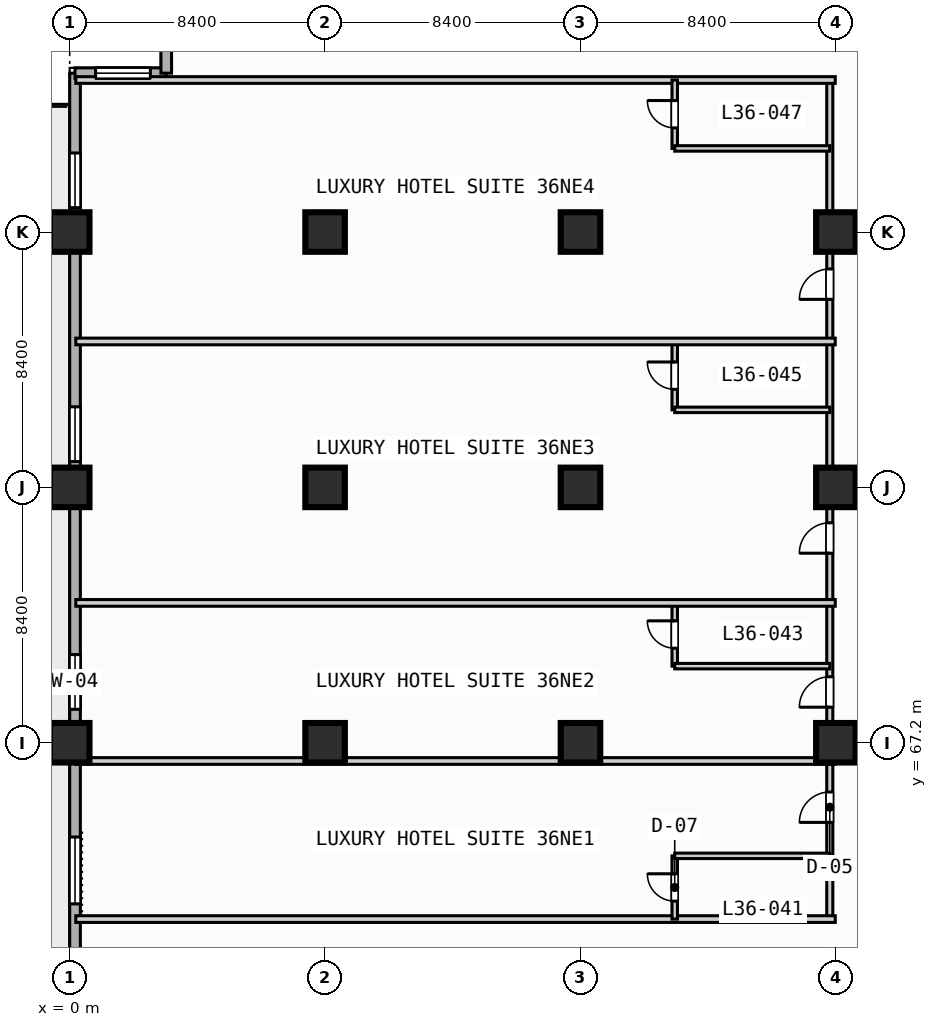
"""IFC4 building model, lengths in metres.
Left out: names, types, materials, properties, quantities, classifications, styles, units other than length and angle.
Written with IfcOpenShell. Run it as: python <this file> out.ifc"""

import sys

from ifc_helpers import new_model, si_unit, direction, frame, frame_2d, origin, origin_2d, place, context, subcontext, project, spatial, rectangle, extrude, element, fill, save


model = new_model("IFC4")
c1 = context("Model", 3, precision=1e-05, world=origin(), true_north=direction((0.0, 1.0)))
c2 = subcontext(c1, "Body", "Model", "MODEL_VIEW")
j1 = project(units=[si_unit("LENGTHUNIT", "METRE"), si_unit("PLANEANGLEUNIT", "RADIAN")], contexts=[c1])
p1 = place(None, origin())
s1 = spatial("IfcSite", under=j1, at=p1, CompositionType="ELEMENT")
p2 = place(p1, origin())
s2 = spatial("IfcBuilding", under=s1, at=p2, CompositionType="ELEMENT")
p3 = place(p2, frame((0.0, 0.0, 149.4)))
s3 = spatial("IfcBuildingStorey", under=s2, at=p3, CompositionType="ELEMENT", Elevation=149.4)
for number, where, z_axis, x_axis in (
    (1, (0.0, 67.2, 0.0), (0.0, 0.0, 1.0), (1.0, 0.0, 0.0)),
    (2, (0.0, 75.6, 0.0), (0.0, 0.0, 1.0), (1.0, 0.0, 0.0)),
    (3, (0.0, 84.0, 0.0), (0.0, 0.0, 1.0), (1.0, 0.0, 0.0)),
    (4, (8.4, 67.2, 0.0), (0.0, 0.0, 1.0), (1.0, 0.0, 0.0)),
    (5, (8.4, 75.6, 0.0), (0.0, 0.0, 1.0), (1.0, 0.0, 0.0)),
    (6, (8.4, 84.0, 0.0), (0.0, 0.0, 1.0), (1.0, 0.0, 0.0)),
    (7, (16.8, 67.2, 0.0), (0.0, 0.0, 1.0), (1.0, 0.0, 0.0)),
    (8, (16.8, 75.6, 0.0), (0.0, 0.0, 1.0), (1.0, 0.0, 0.0)),
    (9, (16.8, 84.0, 0.0), (0.0, 0.0, 1.0), (1.0, 0.0, 0.0)),
    (10, (25.2, 67.2, 0.0), (0.0, 0.0, 1.0), (1.0, 0.0, 0.0)),
    (11, (25.2, 75.6, 0.0), (0.0, 0.0, 1.0), (1.0, 0.0, 0.0)),
    (12, (25.2, 84.0, 0.0), (0.0, 0.0, 1.0), (1.0, 0.0, 0.0)),
):
    element("IfcColumn", number, at=place(p3, frame(where, z_axis=z_axis, x_axis=x_axis)), inside=s3, PredefinedType="COLUMN", context=c2, shape_type="SweptSolid", body=[
        extrude(rectangle(XDim=1.3, YDim=1.3, at=origin_2d()), origin(), (0.0, 0.0, 1.0), 3.8),
    ])
p4 = place(p3, frame((0.175, 3.175, 0.0), z_axis=(0.0, 0.0, 1.0), x_axis=(0.0, 1.0, 0.0)))
e13 = element("IfcWall", 13, at=p4, inside=s3, PredefinedType="STANDARD", context=c2, shape_type="SweptSolid", body=[
    extrude(rectangle(XDim=86.05, YDim=0.35, at=frame_2d((43.025, 0.0))), origin(), (0.0, 0.0, 1.0), 3.55),
])
p5 = place(p4, frame((42.325, 0.0, 0.0)))
e14 = element("IfcOpeningElement", 14, at=p5, cuts=e13, PredefinedType="OPENING", context=c2, shape_type="SweptSolid", body=[
    extrude(rectangle(XDim=1.4, YDim=2.2, at=frame_2d((0.7, 1.1))), frame((0.0, 0.185, 0.0), z_axis=(0.0, -1.0, 0.0), x_axis=(1.0, 0.0, 0.0)), (0.0, 0.0, 1.0), 0.37),
])
p6 = place(p4, frame((25.125, 0.0, 0.85)))
e15 = element("IfcOpeningElement", 15, at=p6, cuts=e13, PredefinedType="OPENING", context=c2, shape_type="SweptSolid", body=[
    extrude(rectangle(XDim=2.2, YDim=1.8, at=frame_2d((1.1, 0.9))), frame((0.0, 0.185, 0.0), z_axis=(0.0, -1.0, 0.0), x_axis=(1.0, 0.0, 0.0)), (0.0, 0.0, 1.0), 0.37),
])
p7 = place(p4, frame((33.525, 0.0, 0.85)))
e16 = element("IfcOpeningElement", 16, at=p7, cuts=e13, PredefinedType="OPENING", context=c2, shape_type="SweptSolid", body=[
    extrude(rectangle(XDim=2.2, YDim=1.8, at=frame_2d((1.1, 0.9))), frame((0.0, 0.185, 0.0), z_axis=(0.0, -1.0, 0.0), x_axis=(1.0, 0.0, 0.0)), (0.0, 0.0, 1.0), 0.37),
])
p8 = place(p4, frame((58.725, 0.0, 0.85)))
e17 = element("IfcOpeningElement", 17, at=p8, cuts=e13, PredefinedType="OPENING", context=c2, shape_type="SweptSolid", body=[
    extrude(rectangle(XDim=2.2, YDim=1.8, at=frame_2d((1.1, 0.9))), frame((0.0, 0.185, 0.0), z_axis=(0.0, -1.0, 0.0), x_axis=(1.0, 0.0, 0.0)), (0.0, 0.0, 1.0), 0.37),
])
p9 = place(p4, frame((65.125, 0.0, 0.85)))
e18 = element("IfcOpeningElement", 18, at=p9, cuts=e13, PredefinedType="OPENING", context=c2, shape_type="SweptSolid", body=[
    extrude(rectangle(XDim=1.8, YDim=1.8, at=frame_2d((0.9, 0.9))), frame((0.0, 0.185, 0.0), z_axis=(0.0, -1.0, 0.0), x_axis=(1.0, 0.0, 0.0)), (0.0, 0.0, 1.0), 0.37),
])
p10 = place(p4, frame((73.275, 0.0, 0.85)))
e19 = element("IfcOpeningElement", 19, at=p10, cuts=e13, PredefinedType="OPENING", context=c2, shape_type="SweptSolid", body=[
    extrude(rectangle(XDim=1.8, YDim=1.8, at=frame_2d((0.9, 0.9))), frame((0.0, 0.185, 0.0), z_axis=(0.0, -1.0, 0.0), x_axis=(1.0, 0.0, 0.0)), (0.0, 0.0, 1.0), 0.37),
])
p11 = place(p4, frame((81.625, 0.0, 0.85)))
e20 = element("IfcOpeningElement", 20, at=p11, cuts=e13, PredefinedType="OPENING", context=c2, shape_type="SweptSolid", body=[
    extrude(rectangle(XDim=1.8, YDim=1.8, at=frame_2d((0.9, 0.9))), frame((0.0, 0.185, 0.0), z_axis=(0.0, -1.0, 0.0), x_axis=(1.0, 0.0, 0.0)), (0.0, 0.0, 1.0), 0.37),
])
p12 = place(p3, frame((0.175, 89.225, 0.0), z_axis=(0.0, 0.0, 1.0), x_axis=(1.0, 0.0, 0.0)))
e21 = element("IfcWall", 21, at=p12, inside=s3, PredefinedType="STANDARD", context=c2, shape_type="SweptSolid", body=[
    extrude(rectangle(XDim=3.0, YDim=0.35, at=frame_2d((1.5, 0.0))), origin(), (0.0, 0.0, 1.0), 3.55),
])
p13 = place(p12, frame((0.677, 0.0, 0.85)))
e22 = element("IfcOpeningElement", 22, at=p13, cuts=e21, PredefinedType="OPENING", context=c2, shape_type="SweptSolid", body=[
    extrude(rectangle(XDim=1.8, YDim=1.8, at=frame_2d((0.9, 0.9))), frame((0.0, 0.185, 0.0), z_axis=(0.0, -1.0, 0.0), x_axis=(1.0, 0.0, 0.0)), (0.0, 0.0, 1.0), 0.37),
])
p14 = place(p3, frame((3.175, 89.225, 0.0), z_axis=(0.0, 0.0, 1.0), x_axis=(0.0, 1.0, 0.0)))
e23 = element("IfcWall", 23, at=p14, inside=s3, PredefinedType="STANDARD", context=c2, shape_type="SweptSolid", body=[
    extrude(rectangle(XDim=3.0, YDim=0.35, at=frame_2d((1.5, 0.0))), origin(), (0.0, 0.0, 1.0), 3.55),
])
p15 = place(p3, frame((25.0, 61.4, 0.0), z_axis=(0.0, 0.0, 1.0), x_axis=(0.0, 1.0, 0.0)))
e24 = element("IfcWall", 24, at=p15, inside=s3, PredefinedType="PARTITIONING", context=c2, shape_type="SweptSolid", body=[
    extrude(rectangle(XDim=27.6, YDim=0.2, at=frame_2d((13.8, 0.0))), origin(), (0.0, 0.0, 1.0), 2.9),
])
p16 = place(p15, frame((3.18, 0.0, 0.0)))
e25 = element("IfcOpeningElement", 25, at=p16, cuts=e24, PredefinedType="OPENING", context=c2, shape_type="SweptSolid", body=[
    extrude(rectangle(XDim=1.0, YDim=2.15, at=frame_2d((0.5, 1.075))), frame((0.0, 0.11, 0.0), z_axis=(0.0, -1.0, 0.0), x_axis=(1.0, 0.0, 0.0)), (0.0, 0.0, 1.0), 0.22),
])
p17 = place(p15, frame((6.97, 0.0, 0.0)))
e26 = element("IfcOpeningElement", 26, at=p17, cuts=e24, PredefinedType="OPENING", context=c2, shape_type="SweptSolid", body=[
    extrude(rectangle(XDim=1.0, YDim=2.15, at=frame_2d((0.5, 1.075))), frame((0.0, 0.11, 0.0), z_axis=(0.0, -1.0, 0.0), x_axis=(1.0, 0.0, 0.0)), (0.0, 0.0, 1.0), 0.22),
])
p18 = place(p15, frame((12.035, 0.0, 0.0)))
e27 = element("IfcOpeningElement", 27, at=p18, cuts=e24, PredefinedType="OPENING", context=c2, shape_type="SweptSolid", body=[
    extrude(rectangle(XDim=1.0, YDim=2.15, at=frame_2d((0.5, 1.075))), frame((0.0, 0.11, 0.0), z_axis=(0.0, -1.0, 0.0), x_axis=(1.0, 0.0, 0.0)), (0.0, 0.0, 1.0), 0.22),
])
p19 = place(p15, frame((20.385, 0.0, 0.0)))
e28 = element("IfcOpeningElement", 28, at=p19, cuts=e24, PredefinedType="OPENING", context=c2, shape_type="SweptSolid", body=[
    extrude(rectangle(XDim=1.0, YDim=2.15, at=frame_2d((0.5, 1.075))), frame((0.0, 0.11, 0.0), z_axis=(0.0, -1.0, 0.0), x_axis=(1.0, 0.0, 0.0)), (0.0, 0.0, 1.0), 0.22),
])
p20 = place(p3, frame((0.2, 61.4, 0.0), z_axis=(0.0, 0.0, 1.0), x_axis=(1.0, 0.0, 0.0)))
e29 = element("IfcWall", 29, at=p20, inside=s3, PredefinedType="PARTITIONING", context=c2, shape_type="SweptSolid", body=[
    extrude(rectangle(XDim=24.98, YDim=0.22, at=frame_2d((12.49, 0.0))), origin(), (0.0, 0.0, 1.0), 3.55),
])
p21 = place(p3, frame((19.9, 61.4, 0.0), z_axis=(0.0, 0.0, 1.0), x_axis=(0.0, 1.0, 0.0)))
e30 = element("IfcWall", 30, at=p21, inside=s3, PredefinedType="PLUMBINGWALL", context=c2, shape_type="SweptSolid", body=[
    extrude(rectangle(XDim=2.08, YDim=0.18, at=frame_2d((1.04, 0.0))), origin(), (0.0, 0.0, 1.0), 3.55),
])
p22 = place(p21, frame((0.59, 0.0, 0.0)))
e31 = element("IfcOpeningElement", 31, at=p22, cuts=e30, PredefinedType="OPENING", context=c2, shape_type="SweptSolid", body=[
    extrude(rectangle(XDim=0.9, YDim=2.1, at=frame_2d((0.45, 1.05))), frame((0.0, 0.1, 0.0), z_axis=(0.0, -1.0, 0.0), x_axis=(1.0, 0.0, 0.0)), (0.0, 0.0, 1.0), 0.2),
])
p23 = place(p3, frame((19.9, 63.48, 0.0), z_axis=(0.0, 0.0, 1.0), x_axis=(1.0, 0.0, 0.0)))
e32 = element("IfcWall", 32, at=p23, inside=s3, PredefinedType="PLUMBINGWALL", context=c2, shape_type="SweptSolid", body=[
    extrude(rectangle(XDim=5.1, YDim=0.18, at=frame_2d((2.55, 0.0))), origin(), (0.0, 0.0, 1.0), 3.55),
])
p24 = place(p3, frame((0.2, 66.6, 0.0), z_axis=(0.0, 0.0, 1.0), x_axis=(1.0, 0.0, 0.0)))
e33 = element("IfcWall", 33, at=p24, inside=s3, PredefinedType="PARTITIONING", context=c2, shape_type="SweptSolid", body=[
    extrude(rectangle(XDim=24.98, YDim=0.22, at=frame_2d((12.49, 0.0))), origin(), (0.0, 0.0, 1.0), 3.55),
])
p25 = place(p3, frame((19.9, 69.72, 0.0), z_axis=(0.0, 0.0, 1.0), x_axis=(0.0, 1.0, 0.0)))
e34 = element("IfcWall", 34, at=p25, inside=s3, PredefinedType="PLUMBINGWALL", context=c2, shape_type="SweptSolid", body=[
    extrude(rectangle(XDim=2.08, YDim=0.18, at=frame_2d((1.04, 0.0))), origin(), (0.0, 0.0, 1.0), 3.55),
])
p26 = place(p25, frame((0.59, 0.0, 0.0)))
e35 = element("IfcOpeningElement", 35, at=p26, cuts=e34, PredefinedType="OPENING", context=c2, shape_type="SweptSolid", body=[
    extrude(rectangle(XDim=0.9, YDim=2.1, at=frame_2d((0.45, 1.05))), frame((0.0, 0.1, 0.0), z_axis=(0.0, -1.0, 0.0), x_axis=(1.0, 0.0, 0.0)), (0.0, 0.0, 1.0), 0.2),
])
p27 = place(p3, frame((19.9, 69.72, 0.0), z_axis=(0.0, 0.0, 1.0), x_axis=(1.0, 0.0, 0.0)))
e36 = element("IfcWall", 36, at=p27, inside=s3, PredefinedType="PLUMBINGWALL", context=c2, shape_type="SweptSolid", body=[
    extrude(rectangle(XDim=5.1, YDim=0.18, at=frame_2d((2.55, 0.0))), origin(), (0.0, 0.0, 1.0), 3.55),
])
p28 = place(p3, frame((0.2, 71.8, 0.0), z_axis=(0.0, 0.0, 1.0), x_axis=(1.0, 0.0, 0.0)))
e37 = element("IfcWall", 37, at=p28, inside=s3, PredefinedType="PARTITIONING", context=c2, shape_type="SweptSolid", body=[
    extrude(rectangle(XDim=24.98, YDim=0.22, at=frame_2d((12.49, 0.0))), origin(), (0.0, 0.0, 1.0), 3.55),
])
p29 = place(p3, frame((19.9, 78.15, 0.0), z_axis=(0.0, 0.0, 1.0), x_axis=(0.0, 1.0, 0.0)))
e38 = element("IfcWall", 38, at=p29, inside=s3, PredefinedType="PLUMBINGWALL", context=c2, shape_type="SweptSolid", body=[
    extrude(rectangle(XDim=2.25, YDim=0.18, at=frame_2d((1.125, 0.0))), origin(), (0.0, 0.0, 1.0), 3.55),
])
p30 = place(p29, frame((0.675, 0.0, 0.0)))
e39 = element("IfcOpeningElement", 39, at=p30, cuts=e38, PredefinedType="OPENING", context=c2, shape_type="SweptSolid", body=[
    extrude(rectangle(XDim=0.9, YDim=2.1, at=frame_2d((0.45, 1.05))), frame((0.0, 0.1, 0.0), z_axis=(0.0, -1.0, 0.0), x_axis=(1.0, 0.0, 0.0)), (0.0, 0.0, 1.0), 0.2),
])
p31 = place(p3, frame((19.9, 78.15, 0.0), z_axis=(0.0, 0.0, 1.0), x_axis=(1.0, 0.0, 0.0)))
e40 = element("IfcWall", 40, at=p31, inside=s3, PredefinedType="PLUMBINGWALL", context=c2, shape_type="SweptSolid", body=[
    extrude(rectangle(XDim=5.1, YDim=0.18, at=frame_2d((2.55, 0.0))), origin(), (0.0, 0.0, 1.0), 3.55),
])
for number, where, z_axis, x_axis in (
    (41, (0.2, 80.4, 0.0), (0.0, 0.0, 1.0), (1.0, 0.0, 0.0)),
    (42, (0.2, 89.0, 0.0), (0.0, 0.0, 1.0), (1.0, 0.0, 0.0)),
):
    element("IfcWall", number, at=place(p3, frame(where, z_axis=z_axis, x_axis=x_axis)), inside=s3, PredefinedType="PARTITIONING", context=c2, shape_type="SweptSolid", body=[
        extrude(rectangle(XDim=24.98, YDim=0.22, at=frame_2d((12.49, 0.0))), origin(), (0.0, 0.0, 1.0), 3.55),
    ])
p32 = place(p3, frame((19.9, 86.75, 0.0), z_axis=(0.0, 0.0, 1.0), x_axis=(0.0, 1.0, 0.0)))
e43 = element("IfcWall", 43, at=p32, inside=s3, PredefinedType="PLUMBINGWALL", context=c2, shape_type="SweptSolid", body=[
    extrude(rectangle(XDim=2.25, YDim=0.18, at=frame_2d((1.125, 0.0))), origin(), (0.0, 0.0, 1.0), 3.55),
])
p33 = place(p32, frame((0.675, 0.0, 0.0)))
e44 = element("IfcOpeningElement", 44, at=p33, cuts=e43, PredefinedType="OPENING", context=c2, shape_type="SweptSolid", body=[
    extrude(rectangle(XDim=0.9, YDim=2.1, at=frame_2d((0.45, 1.05))), frame((0.0, 0.1, 0.0), z_axis=(0.0, -1.0, 0.0), x_axis=(1.0, 0.0, 0.0)), (0.0, 0.0, 1.0), 0.2),
])
p34 = place(p3, frame((19.9, 86.75, 0.0), z_axis=(0.0, 0.0, 1.0), x_axis=(1.0, 0.0, 0.0)))
e45 = element("IfcWall", 45, at=p34, inside=s3, PredefinedType="PLUMBINGWALL", context=c2, shape_type="SweptSolid", body=[
    extrude(rectangle(XDim=5.1, YDim=0.18, at=frame_2d((2.55, 0.0))), origin(), (0.0, 0.0, 1.0), 3.55),
])
p35 = place(p8, origin())
e46 = element("IfcWindow", 46, at=p35, inside=s3, PartitioningType="SINGLE_PANEL", PredefinedType="WINDOW", context=c2, shape_type="SweptSolid", body=[
    extrude(rectangle(XDim=2.2, YDim=1.8, at=frame_2d((1.1, 0.9))), frame((0.0, 0.03, 0.0), z_axis=(0.0, -1.0, 0.0), x_axis=(1.0, 0.0, 0.0)), (0.0, 0.0, 1.0), 0.06),
])
fill(e17, e46)
p36 = place(p9, origin())
e47 = element("IfcWindow", 47, at=p36, inside=s3, PartitioningType="SINGLE_PANEL", PredefinedType="WINDOW", context=c2, shape_type="SweptSolid", body=[
    extrude(rectangle(XDim=1.8, YDim=1.8, at=frame_2d((0.9, 0.9))), frame((0.0, 0.03, 0.0), z_axis=(0.0, -1.0, 0.0), x_axis=(1.0, 0.0, 0.0)), (0.0, 0.0, 1.0), 0.06),
])
fill(e18, e47)
p37 = place(p10, origin())
e48 = element("IfcWindow", 48, at=p37, inside=s3, PartitioningType="SINGLE_PANEL", PredefinedType="WINDOW", context=c2, shape_type="SweptSolid", body=[
    extrude(rectangle(XDim=1.8, YDim=1.8, at=frame_2d((0.9, 0.9))), frame((0.0, 0.03, 0.0), z_axis=(0.0, -1.0, 0.0), x_axis=(1.0, 0.0, 0.0)), (0.0, 0.0, 1.0), 0.06),
])
fill(e19, e48)
p38 = place(p11, origin())
e49 = element("IfcWindow", 49, at=p38, inside=s3, PartitioningType="SINGLE_PANEL", PredefinedType="WINDOW", context=c2, shape_type="SweptSolid", body=[
    extrude(rectangle(XDim=1.8, YDim=1.8, at=frame_2d((0.9, 0.9))), frame((0.0, 0.03, 0.0), z_axis=(0.0, -1.0, 0.0), x_axis=(1.0, 0.0, 0.0)), (0.0, 0.0, 1.0), 0.06),
])
fill(e20, e49)
p39 = place(p13, origin())
e50 = element("IfcWindow", 50, at=p39, inside=s3, PartitioningType="SINGLE_PANEL", PredefinedType="WINDOW", context=c2, shape_type="SweptSolid", body=[
    extrude(rectangle(XDim=1.8, YDim=1.8, at=frame_2d((0.9, 0.9))), frame((0.0, 0.03, 0.0), z_axis=(0.0, -1.0, 0.0), x_axis=(1.0, 0.0, 0.0)), (0.0, 0.0, 1.0), 0.06),
])
fill(e22, e50)
p40 = place(p16, origin())
e51 = element("IfcDoor", 51, at=p40, inside=s3, OperationType="SINGLE_SWING_LEFT", PredefinedType="DOOR", context=c2, shape_type="SweptSolid", body=[
    extrude(rectangle(XDim=1.0, YDim=2.15, at=frame_2d((0.5, 1.075))), frame((0.0, 0.025, 0.0), z_axis=(0.0, -1.0, 0.0), x_axis=(1.0, 0.0, 0.0)), (0.0, 0.0, 1.0), 0.05),
])
fill(e25, e51)
p41 = place(p17, origin())
e52 = element("IfcDoor", 52, at=p41, inside=s3, OperationType="SINGLE_SWING_LEFT", PredefinedType="DOOR", context=c2, shape_type="SweptSolid", body=[
    extrude(rectangle(XDim=1.0, YDim=2.15, at=frame_2d((0.5, 1.075))), frame((0.0, 0.025, 0.0), z_axis=(0.0, -1.0, 0.0), x_axis=(1.0, 0.0, 0.0)), (0.0, 0.0, 1.0), 0.05),
])
fill(e26, e52)
p42 = place(p18, origin())
e53 = element("IfcDoor", 53, at=p42, inside=s3, OperationType="SINGLE_SWING_LEFT", PredefinedType="DOOR", context=c2, shape_type="SweptSolid", body=[
    extrude(rectangle(XDim=1.0, YDim=2.15, at=frame_2d((0.5, 1.075))), frame((0.0, 0.025, 0.0), z_axis=(0.0, -1.0, 0.0), x_axis=(1.0, 0.0, 0.0)), (0.0, 0.0, 1.0), 0.05),
])
fill(e27, e53)
p43 = place(p19, origin())
e54 = element("IfcDoor", 54, at=p43, inside=s3, OperationType="SINGLE_SWING_LEFT", PredefinedType="DOOR", context=c2, shape_type="SweptSolid", body=[
    extrude(rectangle(XDim=1.0, YDim=2.15, at=frame_2d((0.5, 1.075))), frame((0.0, 0.025, 0.0), z_axis=(0.0, -1.0, 0.0), x_axis=(1.0, 0.0, 0.0)), (0.0, 0.0, 1.0), 0.05),
])
fill(e28, e54)
p44 = place(p22, origin())
e55 = element("IfcDoor", 55, at=p44, inside=s3, OperationType="SINGLE_SWING_RIGHT", PredefinedType="DOOR", context=c2, shape_type="SweptSolid", body=[
    extrude(rectangle(XDim=0.9, YDim=2.1, at=frame_2d((0.45, 1.05))), frame((0.0, 0.025, 0.0), z_axis=(0.0, -1.0, 0.0), x_axis=(1.0, 0.0, 0.0)), (0.0, 0.0, 1.0), 0.05),
])
fill(e31, e55)
p45 = place(p26, origin())
e56 = element("IfcDoor", 56, at=p45, inside=s3, OperationType="SINGLE_SWING_RIGHT", PredefinedType="DOOR", context=c2, shape_type="SweptSolid", body=[
    extrude(rectangle(XDim=0.9, YDim=2.1, at=frame_2d((0.45, 1.05))), frame((0.0, 0.025, 0.0), z_axis=(0.0, -1.0, 0.0), x_axis=(1.0, 0.0, 0.0)), (0.0, 0.0, 1.0), 0.05),
])
fill(e35, e56)
p46 = place(p30, origin())
e57 = element("IfcDoor", 57, at=p46, inside=s3, OperationType="SINGLE_SWING_RIGHT", PredefinedType="DOOR", context=c2, shape_type="SweptSolid", body=[
    extrude(rectangle(XDim=0.9, YDim=2.1, at=frame_2d((0.45, 1.05))), frame((0.0, 0.025, 0.0), z_axis=(0.0, -1.0, 0.0), x_axis=(1.0, 0.0, 0.0)), (0.0, 0.0, 1.0), 0.05),
])
fill(e39, e57)
p47 = place(p33, origin())
e58 = element("IfcDoor", 58, at=p47, inside=s3, OperationType="SINGLE_SWING_RIGHT", PredefinedType="DOOR", context=c2, shape_type="SweptSolid", body=[
    extrude(rectangle(XDim=0.9, YDim=2.1, at=frame_2d((0.45, 1.05))), frame((0.0, 0.025, 0.0), z_axis=(0.0, -1.0, 0.0), x_axis=(1.0, 0.0, 0.0)), (0.0, 0.0, 1.0), 0.05),
])
fill(e44, e58)
save(model, sys.argv[1])
